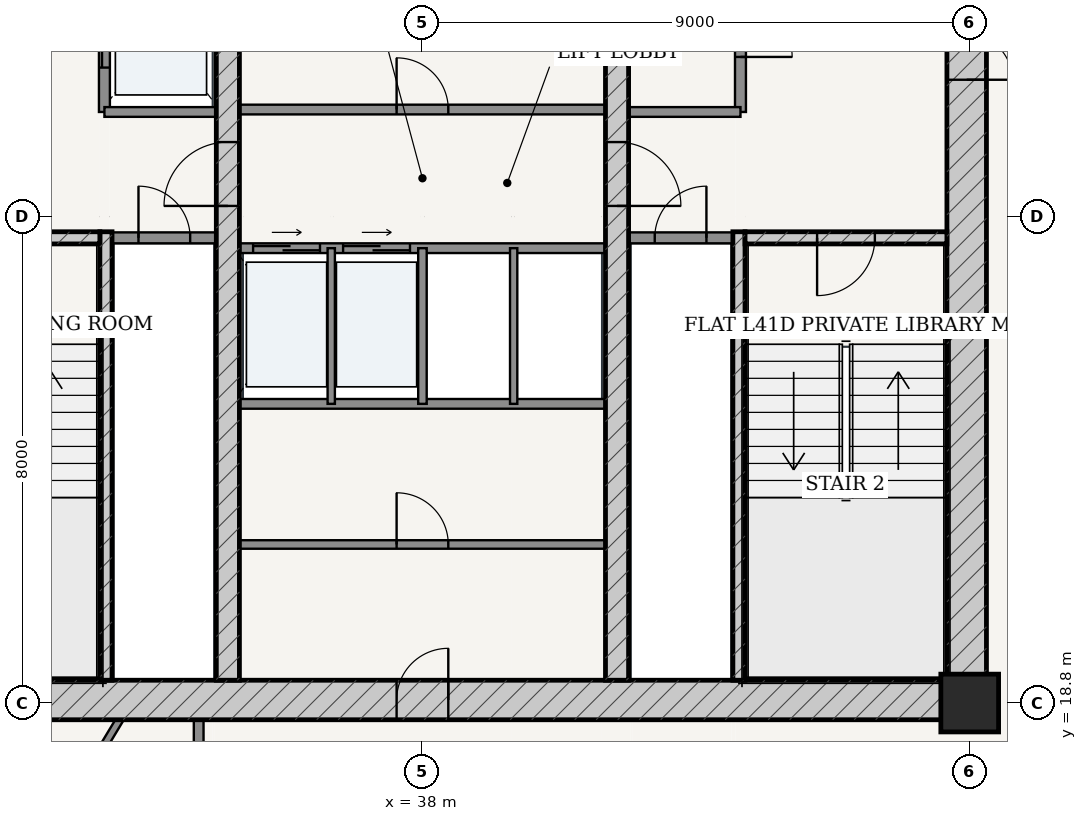
"""IFC4 building model, lengths in metres.
Left out: names, types, materials, properties, quantities, classifications, styles, units other than length and angle.
Written with IfcOpenShell. Run it as: python <this file> out.ifc"""

import sys

from ifc_helpers import new_model, si_unit, direction, frame, frame_2d, origin, origin_2d, place, context, subcontext, project, spatial, rectangle, extrude, source, transform, mapped, element, fill, save


model = new_model("IFC4")
c1 = context("Model", 3, precision=1e-05, world=origin(), true_north=direction((-0.2419218956, 0.970295726276)))
c2 = subcontext(c1, "Body", "Model", "MODEL_VIEW")
j1 = project(units=[si_unit("LENGTHUNIT", "METRE"), si_unit("PLANEANGLEUNIT", "RADIAN")], contexts=[c1])
p1 = place(None, origin())
s1 = spatial("IfcSite", under=j1, at=p1, CompositionType="ELEMENT")
p2 = place(p1, origin())
s2 = spatial("IfcBuilding", under=s1, at=p2, CompositionType="ELEMENT")
p3 = place(p2, frame((0.0, 0.0, 157.0)))
s3 = spatial("IfcBuildingStorey", under=s2, at=p3, CompositionType="ELEMENT", Elevation=157.0)
p4 = place(p3, frame((47.0, 18.8, 0.0), z_axis=(0.0, 0.0, 1.0), x_axis=(1.0, 0.0, 0.0)))
e1 = element("IfcColumn", 1, at=p4, inside=s3, PredefinedType="COLUMN", context=c2, shape_type="SweptSolid", body=[
    extrude(rectangle(XDim=0.95, YDim=0.95, at=origin_2d()), origin(), (0.0, 0.0, 1.0), 3.6),
])
p5 = place(p3, frame((28.725, 18.85, 0.0), z_axis=(0.0, 0.0, 1.0), x_axis=(1.0, 0.0, 0.0)))
e2 = element("IfcWall", 2, at=p5, inside=s3, PredefinedType="SHEAR", context=c2, shape_type="SweptSolid", body=[
    extrude(rectangle(XDim=18.55, YDim=0.65, at=frame_2d((9.275, 0.0))), origin(), (0.0, 0.0, 1.0), 3.33),
])
p6 = place(p5, frame((8.85, 0.0, 0.0)))
e3 = element("IfcOpeningElement", 3, at=p6, cuts=e2, PredefinedType="OPENING", context=c2, shape_type="SweptSolid", body=[
    extrude(rectangle(XDim=0.85, YDim=2.1, at=frame_2d((0.425, 1.05))), frame((0.0, 0.335, 0.0), z_axis=(0.0, -1.0, 0.0), x_axis=(1.0, 0.0, 0.0)), (0.0, 0.0, 1.0), 0.67),
])
p7 = place(p3, frame((46.95, 19.175, 0.0), z_axis=(0.0, 0.0, 1.0), x_axis=(0.0, 1.0, 0.0)))
e4 = element("IfcWall", 4, at=p7, inside=s3, PredefinedType="SHEAR", context=c2, shape_type="SweptSolid", body=[
    extrude(rectangle(XDim=15.25, YDim=0.65, at=frame_2d((7.625, 0.0))), origin(), (0.0, 0.0, 1.0), 3.33),
])
p8 = place(p7, frame((9.875, 0.0, 0.0)))
e5 = element("IfcOpeningElement", 5, at=p8, cuts=e4, PredefinedType="OPENING", context=c2, shape_type="SweptSolid", body=[
    extrude(rectangle(XDim=1.5, YDim=2.2, at=frame_2d((0.75, 1.1))), frame((0.0, 0.335, 0.0), z_axis=(0.0, -1.0, 0.0), x_axis=(1.0, 0.0, 0.0)), (0.0, 0.0, 1.0), 0.67),
])
p9 = place(p3, frame((32.795, 19.175, 0.0), z_axis=(0.0, 0.0, 1.0), x_axis=(0.0, 1.0, 0.0)))
e6 = element("IfcWall", 6, at=p9, inside=s3, PredefinedType="SOLIDWALL", context=c2, shape_type="SweptSolid", body=[
    extrude(rectangle(XDim=7.375, YDim=0.2, at=frame_2d((3.688, 0.0))), origin(), (0.0, 0.0, 1.0), 3.33),
])
p10 = place(p3, frame((29.375, 26.45, 0.0), z_axis=(0.0, 0.0, 1.0), x_axis=(1.0, 0.0, 0.0)))
e7 = element("IfcWall", 7, at=p10, inside=s3, PredefinedType="SOLIDWALL", context=c2, shape_type="SweptSolid", body=[
    extrude(rectangle(XDim=3.32, YDim=0.2, at=frame_2d((1.66, 0.0))), origin(), (0.0, 0.0, 1.0), 3.33),
])
p11 = place(p10, frame((1.185, 0.0, 0.0)))
e8 = element("IfcOpeningElement", 8, at=p11, cuts=e7, PredefinedType="OPENING", context=c2, shape_type="SweptSolid", body=[
    extrude(rectangle(XDim=0.95, YDim=2.15, at=frame_2d((0.475, 1.075))), frame((0.0, 0.11, 0.0), z_axis=(0.0, -1.0, 0.0), x_axis=(1.0, 0.0, 0.0)), (0.0, 0.0, 1.0), 0.22),
])
p12 = place(p3, frame((43.205, 19.175, 0.0), z_axis=(0.0, 0.0, 1.0), x_axis=(0.0, 1.0, 0.0)))
e9 = element("IfcWall", 9, at=p12, inside=s3, PredefinedType="SOLIDWALL", context=c2, shape_type="SweptSolid", body=[
    extrude(rectangle(XDim=7.375, YDim=0.2, at=frame_2d((3.688, 0.0))), origin(), (0.0, 0.0, 1.0), 3.33),
])
p13 = place(p3, frame((43.305, 26.45, 0.0), z_axis=(0.0, 0.0, 1.0), x_axis=(1.0, 0.0, 0.0)))
e10 = element("IfcWall", 10, at=p13, inside=s3, PredefinedType="SOLIDWALL", context=c2, shape_type="SweptSolid", body=[
    extrude(rectangle(XDim=3.32, YDim=0.2, at=frame_2d((1.66, 0.0))), origin(), (0.0, 0.0, 1.0), 3.33),
])
p14 = place(p13, frame((1.185, 0.0, 0.0)))
e11 = element("IfcOpeningElement", 11, at=p14, cuts=e10, PredefinedType="OPENING", context=c2, shape_type="SweptSolid", body=[
    extrude(rectangle(XDim=0.95, YDim=2.15, at=frame_2d((0.475, 1.075))), frame((0.0, 0.11, 0.0), z_axis=(0.0, -1.0, 0.0), x_axis=(1.0, 0.0, 0.0)), (0.0, 0.0, 1.0), 0.22),
])
p15 = place(p3, frame((34.8, 19.175, 0.0), z_axis=(0.0, 0.0, 1.0), x_axis=(0.0, 1.0, 0.0)))
e12 = element("IfcWall", 12, at=p15, inside=s3, PredefinedType="SHEAR", context=c2, shape_type="SweptSolid", body=[
    extrude(rectangle(XDim=15.25, YDim=0.38, at=frame_2d((7.625, 0.0))), origin(), (0.0, 0.0, 1.0), 3.33),
])
p16 = place(p15, frame((7.8, 0.0, 0.0)))
e13 = element("IfcOpeningElement", 13, at=p16, cuts=e12, PredefinedType="OPENING", context=c2, shape_type="SweptSolid", body=[
    extrude(rectangle(XDim=1.05, YDim=2.15, at=frame_2d((0.525, 1.075))), frame((0.0, 0.2, 0.0), z_axis=(0.0, -1.0, 0.0), x_axis=(1.0, 0.0, 0.0)), (0.0, 0.0, 1.0), 0.4),
])
p17 = place(p3, frame((41.2, 19.175, 0.0), z_axis=(0.0, 0.0, 1.0), x_axis=(0.0, 1.0, 0.0)))
e14 = element("IfcWall", 14, at=p17, inside=s3, PredefinedType="SHEAR", context=c2, shape_type="SweptSolid", body=[
    extrude(rectangle(XDim=15.25, YDim=0.38, at=frame_2d((7.625, 0.0))), origin(), (0.0, 0.0, 1.0), 3.33),
])
p18 = place(p17, frame((7.8, 0.0, 0.0)))
e15 = element("IfcOpeningElement", 15, at=p18, cuts=e14, PredefinedType="OPENING", context=c2, shape_type="SweptSolid", body=[
    extrude(rectangle(XDim=1.05, YDim=2.15, at=frame_2d((0.525, 1.075))), frame((0.0, 0.2, 0.0), z_axis=(0.0, -1.0, 0.0), x_axis=(1.0, 0.0, 0.0)), (0.0, 0.0, 1.0), 0.4),
])
p19 = place(p3, frame((32.9, 26.45, 0.0), z_axis=(0.0, 0.0, 1.0), x_axis=(1.0, 0.0, 0.0)))
e16 = element("IfcWall", 16, at=p19, inside=s3, PredefinedType="PARTITIONING", context=c2, shape_type="SweptSolid", body=[
    extrude(rectangle(XDim=1.71, YDim=0.18, at=frame_2d((0.855, 0.0))), origin(), (0.0, 0.0, 1.0), 3.33),
])
p20 = place(p19, frame((0.43, 0.0, 0.0)))
e17 = element("IfcOpeningElement", 17, at=p20, cuts=e16, PredefinedType="OPENING", context=c2, shape_type="SweptSolid", body=[
    extrude(rectangle(XDim=0.85, YDim=2.1, at=frame_2d((0.425, 1.05))), frame((0.0, 0.1, 0.0), z_axis=(0.0, -1.0, 0.0), x_axis=(1.0, 0.0, 0.0)), (0.0, 0.0, 1.0), 0.2),
])
p21 = place(p3, frame((41.39, 26.45, 0.0), z_axis=(0.0, 0.0, 1.0), x_axis=(1.0, 0.0, 0.0)))
e18 = element("IfcWall", 18, at=p21, inside=s3, PredefinedType="PARTITIONING", context=c2, shape_type="SweptSolid", body=[
    extrude(rectangle(XDim=1.71, YDim=0.18, at=frame_2d((0.855, 0.0))), origin(), (0.0, 0.0, 1.0), 3.33),
])
p22 = place(p21, frame((0.43, 0.0, 0.0)))
e19 = element("IfcOpeningElement", 19, at=p22, cuts=e18, PredefinedType="OPENING", context=c2, shape_type="SweptSolid", body=[
    extrude(rectangle(XDim=0.85, YDim=2.1, at=frame_2d((0.425, 1.05))), frame((0.0, 0.1, 0.0), z_axis=(0.0, -1.0, 0.0), x_axis=(1.0, 0.0, 0.0)), (0.0, 0.0, 1.0), 0.2),
])
p23 = place(p3, frame((32.77, 28.52, 0.0), z_axis=(0.0, 0.0, 1.0), x_axis=(0.0, 1.0, 0.0)))
e20 = element("IfcWall", 20, at=p23, inside=s3, PredefinedType="PARTITIONING", context=c2, shape_type="SweptSolid", body=[
    extrude(rectangle(XDim=5.905, YDim=0.18, at=frame_2d((2.953, 0.0))), origin(), (0.0, 0.0, 1.0), 3.33),
])
p24 = place(p23, frame((3.655, 0.0, 0.0)))
e21 = element("IfcOpeningElement", 21, at=p24, cuts=e20, PredefinedType="OPENING", context=c2, shape_type="SweptSolid", body=[
    extrude(rectangle(XDim=1.15, YDim=2.2, at=frame_2d((0.575, 1.1))), frame((0.0, 0.1, 0.0), z_axis=(0.0, -1.0, 0.0), x_axis=(1.0, 0.0, 0.0)), (0.0, 0.0, 1.0), 0.2),
])
p25 = place(p23, frame((0.73, 0.0, 0.0)))
e22 = element("IfcOpeningElement", 22, at=p25, cuts=e20, PredefinedType="OPENING", context=c2, shape_type="SweptSolid", body=[
    extrude(rectangle(XDim=1.2, YDim=2.25, at=frame_2d((0.6, 1.125))), frame((0.0, 0.1, 0.0), z_axis=(0.0, -1.0, 0.0), x_axis=(1.0, 0.0, 0.0)), (0.0, 0.0, 1.0), 0.2),
])
p26 = place(p3, frame((32.77, 28.52, 0.0), z_axis=(0.0, 0.0, 1.0), x_axis=(1.0, 0.0, 0.0)))
e23 = element("IfcWall", 23, at=p26, inside=s3, PredefinedType="PARTITIONING", context=c2, shape_type="SweptSolid", body=[
    extrude(rectangle(XDim=1.84, YDim=0.16, at=frame_2d((0.92, 0.0))), origin(), (0.0, 0.0, 1.0), 3.33),
])
p27 = place(p3, frame((43.23, 28.52, 0.0), z_axis=(0.0, 0.0, 1.0), x_axis=(0.0, 1.0, 0.0)))
e24 = element("IfcWall", 24, at=p27, inside=s3, PredefinedType="PARTITIONING", context=c2, shape_type="SweptSolid", body=[
    extrude(rectangle(XDim=5.905, YDim=0.18, at=frame_2d((2.953, 0.0))), origin(), (0.0, 0.0, 1.0), 3.33),
])
p28 = place(p27, frame((0.905, 0.0, 0.0)))
e25 = element("IfcOpeningElement", 25, at=p28, cuts=e24, PredefinedType="OPENING", context=c2, shape_type="SweptSolid", body=[
    extrude(rectangle(XDim=0.85, YDim=2.1, at=frame_2d((0.425, 1.05))), frame((0.0, 0.1, 0.0), z_axis=(0.0, -1.0, 0.0), x_axis=(1.0, 0.0, 0.0)), (0.0, 0.0, 1.0), 0.2),
])
p29 = place(p27, frame((3.655, 0.0, 0.0)))
e26 = element("IfcOpeningElement", 26, at=p29, cuts=e24, PredefinedType="OPENING", context=c2, shape_type="SweptSolid", body=[
    extrude(rectangle(XDim=1.15, YDim=2.2, at=frame_2d((0.575, 1.1))), frame((0.0, 0.1, 0.0), z_axis=(0.0, -1.0, 0.0), x_axis=(1.0, 0.0, 0.0)), (0.0, 0.0, 1.0), 0.2),
])
p30 = place(p3, frame((41.39, 28.52, 0.0), z_axis=(0.0, 0.0, 1.0), x_axis=(1.0, 0.0, 0.0)))
e27 = element("IfcWall", 27, at=p30, inside=s3, PredefinedType="PARTITIONING", context=c2, shape_type="SweptSolid", body=[
    extrude(rectangle(XDim=1.84, YDim=0.16, at=frame_2d((0.92, 0.0))), origin(), (0.0, 0.0, 1.0), 3.33),
])
p31 = place(p3, frame((34.99, 28.56, 0.0), z_axis=(0.0, 0.0, 1.0), x_axis=(1.0, 0.0, 0.0)))
e28 = element("IfcWall", 28, at=p31, inside=s3, PredefinedType="PARTITIONING", context=c2, shape_type="SweptSolid", body=[
    extrude(rectangle(XDim=6.02, YDim=0.16, at=frame_2d((3.01, 0.0))), origin(), (0.0, 0.0, 1.0), 3.33),
])
p32 = place(p31, frame((2.585, 0.0, 0.0)))
e29 = element("IfcOpeningElement", 29, at=p32, cuts=e28, PredefinedType="OPENING", context=c2, shape_type="SweptSolid", body=[
    extrude(rectangle(XDim=0.85, YDim=2.1, at=frame_2d((0.425, 1.05))), frame((0.0, 0.09, 0.0), z_axis=(0.0, -1.0, 0.0), x_axis=(1.0, 0.0, 0.0)), (0.0, 0.0, 1.0), 0.18),
])
p33 = place(p3, frame((34.99, 26.28, 0.0), z_axis=(0.0, 0.0, 1.0), x_axis=(1.0, 0.0, 0.0)))
e30 = element("IfcWall", 30, at=p33, inside=s3, PredefinedType="PARTITIONING", context=c2, shape_type="SweptSolid", body=[
    extrude(rectangle(XDim=6.02, YDim=0.16, at=frame_2d((3.01, 0.0))), origin(), (0.0, 0.0, 1.0), 3.33),
])
p34 = place(p33, frame((0.225, 0.0, 0.0)))
e31 = element("IfcOpeningElement", 31, at=p34, cuts=e30, PredefinedType="OPENING", context=c2, shape_type="SweptSolid", body=[
    extrude(rectangle(XDim=1.1, YDim=2.2, at=frame_2d((0.55, 1.1))), frame((0.0, 0.09, 0.0), z_axis=(0.0, -1.0, 0.0), x_axis=(1.0, 0.0, 0.0)), (0.0, 0.0, 1.0), 0.18),
])
p35 = place(p33, frame((1.705, 0.0, 0.0)))
e32 = element("IfcOpeningElement", 32, at=p35, cuts=e30, PredefinedType="OPENING", context=c2, shape_type="SweptSolid", body=[
    extrude(rectangle(XDim=1.1, YDim=2.2, at=frame_2d((0.55, 1.1))), frame((0.0, 0.09, 0.0), z_axis=(0.0, -1.0, 0.0), x_axis=(1.0, 0.0, 0.0)), (0.0, 0.0, 1.0), 0.18),
])
p36 = place(p3, frame((34.99, 23.72, 0.0), z_axis=(0.0, 0.0, 1.0), x_axis=(1.0, 0.0, 0.0)))
e33 = element("IfcWall", 33, at=p36, inside=s3, PredefinedType="PARTITIONING", context=c2, shape_type="SweptSolid", body=[
    extrude(rectangle(XDim=6.02, YDim=0.16, at=frame_2d((3.01, 0.0))), origin(), (0.0, 0.0, 1.0), 3.33),
])
p37 = place(p3, frame((36.5, 23.72, 0.0), z_axis=(0.0, 0.0, 1.0), x_axis=(0.0, 1.0, 0.0)))
e34 = element("IfcWall", 34, at=p37, inside=s3, PredefinedType="PARTITIONING", context=c2, shape_type="SweptSolid", body=[
    extrude(rectangle(XDim=2.56, YDim=0.12, at=frame_2d((1.28, 0.0))), origin(), (0.0, 0.0, 1.0), 3.33),
])
p38 = place(p3, frame((38.0, 23.72, 0.0), z_axis=(0.0, 0.0, 1.0), x_axis=(0.0, 1.0, 0.0)))
e35 = element("IfcWall", 35, at=p38, inside=s3, PredefinedType="PARTITIONING", context=c2, shape_type="SweptSolid", body=[
    extrude(rectangle(XDim=2.56, YDim=0.14, at=frame_2d((1.28, 0.0))), origin(), (0.0, 0.0, 1.0), 3.33),
])
p39 = place(p3, frame((39.5, 23.72, 0.0), z_axis=(0.0, 0.0, 1.0), x_axis=(0.0, 1.0, 0.0)))
e36 = element("IfcWall", 36, at=p39, inside=s3, PredefinedType="PARTITIONING", context=c2, shape_type="SweptSolid", body=[
    extrude(rectangle(XDim=2.56, YDim=0.12, at=frame_2d((1.28, 0.0))), origin(), (0.0, 0.0, 1.0), 3.33),
])
p40 = place(p3, frame((34.99, 21.407, 0.0), z_axis=(0.0, 0.0, 1.0), x_axis=(1.0, 0.0, 0.0)))
e37 = element("IfcWall", 37, at=p40, inside=s3, PredefinedType="PARTITIONING", context=c2, shape_type="SweptSolid", body=[
    extrude(rectangle(XDim=6.02, YDim=0.14, at=frame_2d((3.01, 0.0))), origin(), (0.0, 0.0, 1.0), 3.33),
])
p41 = place(p40, frame((2.585, 0.0, 0.0)))
e38 = element("IfcOpeningElement", 38, at=p41, cuts=e37, PredefinedType="OPENING", context=c2, shape_type="SweptSolid", body=[
    extrude(rectangle(XDim=0.85, YDim=2.1, at=frame_2d((0.425, 1.05))), frame((0.0, 0.08, 0.0), z_axis=(0.0, -1.0, 0.0), x_axis=(1.0, 0.0, 0.0)), (0.0, 0.0, 1.0), 0.16),
])
p42 = place(p3, frame((34.32, 16.675, 0.0), z_axis=(0.0, 0.0, 1.0), x_axis=(0.0, 1.0, 0.0)))
e39 = element("IfcWall", 39, at=p42, inside=s3, PredefinedType="PARTITIONING", context=c2, shape_type="SweptSolid", body=[
    extrude(rectangle(XDim=1.85, YDim=0.16, at=frame_2d((0.925, 0.0))), origin(), (0.0, 0.0, 1.0), 3.33),
])
p43 = place(p3, frame((33.02, 18.525, 0.0), z_axis=(0.0, 0.0, 1.0), x_axis=(-0.515677168, -0.856782970421, 0.0)))
e40 = element("IfcWall", 40, at=p43, inside=s3, PredefinedType="PARTITIONING", context=c2, shape_type="SweptSolid", body=[
    extrude(rectangle(XDim=3.159, YDim=0.12, at=frame_2d((1.58, 0.0))), origin(), (0.0, 0.0, 1.0), 3.33),
])
p44 = place(p43, frame((1.15, 0.0, 0.0)))
e41 = element("IfcOpeningElement", 41, at=p44, cuts=e40, PredefinedType="OPENING", context=c2, shape_type="SweptSolid", body=[
    extrude(rectangle(XDim=0.86, YDim=2.15, at=frame_2d((0.43, 1.075))), frame((0.0, 0.07, 0.0), z_axis=(0.0, -1.0, 0.0), x_axis=(1.0, 0.0, 0.0)), (0.0, 0.0, 1.0), 0.14),
])
m1 = source(origin(), c2, "Body", "SweptSolid", [
    extrude(rectangle(XDim=1.5, YDim=2.2, at=frame_2d((0.75, 1.1))), frame((0.0, 0.025, 0.0), z_axis=(0.0, -1.0, 0.0), x_axis=(1.0, 0.0, 0.0)), (0.0, 0.0, 1.0), 0.05),
])
p45 = place(p8, frame((1.5, 0.0, 0.0), z_axis=(0.0, 0.0, 1.0), x_axis=(-1.0, 0.0, 0.0)))
e42 = element("IfcDoor", 42, at=p45, inside=s3, OperationType="DOUBLE_DOOR_SINGLE_SWING", PredefinedType="DOOR", context=c2, shape_type="MappedRepresentation", body=[
    mapped(m1, transform((0.0, 0.0, 0.0), scale=1.0)),
])
fill(e5, e42)
m2 = source(origin(), c2, "Body", "SweptSolid", [
    extrude(rectangle(XDim=1.05, YDim=2.15, at=frame_2d((0.525, 1.075))), frame((0.0, 0.025, 0.0), z_axis=(0.0, -1.0, 0.0), x_axis=(1.0, 0.0, 0.0)), (0.0, 0.0, 1.0), 0.05),
])
p46 = place(p16, origin())
e43 = element("IfcDoor", 43, at=p46, inside=s3, OperationType="SINGLE_SWING_LEFT", PredefinedType="DOOR", context=c2, shape_type="MappedRepresentation", body=[
    mapped(m2, transform((0.0, 0.0, 0.0), scale=1.0)),
])
fill(e13, e43)
p47 = place(p18, frame((1.05, 0.0, 0.0), z_axis=(0.0, 0.0, 1.0), x_axis=(-1.0, 0.0, 0.0)))
e44 = element("IfcDoor", 44, at=p47, inside=s3, OperationType="SINGLE_SWING_RIGHT", PredefinedType="DOOR", context=c2, shape_type="MappedRepresentation", body=[
    mapped(m2, transform((0.0, 0.0, 0.0), scale=1.0)),
])
fill(e15, e44)
m3 = source(origin(), c2, "Body", "SweptSolid", [
    extrude(rectangle(XDim=0.95, YDim=2.15, at=frame_2d((0.475, 1.075))), frame((0.0, 0.025, 0.0), z_axis=(0.0, -1.0, 0.0), x_axis=(1.0, 0.0, 0.0)), (0.0, 0.0, 1.0), 0.05),
])
p48 = place(p14, frame((0.95, 0.0, 0.0), z_axis=(0.0, 0.0, 1.0), x_axis=(-1.0, 0.0, 0.0)))
e45 = element("IfcDoor", 45, at=p48, inside=s3, OperationType="SINGLE_SWING_RIGHT", PredefinedType="DOOR", context=c2, shape_type="MappedRepresentation", body=[
    mapped(m3, transform((0.0, 0.0, 0.0), scale=1.0)),
])
fill(e11, e45)
m4 = source(origin(), c2, "Body", "SweptSolid", [
    extrude(rectangle(XDim=0.85, YDim=2.1, at=frame_2d((0.425, 1.05))), frame((0.0, 0.025, 0.0), z_axis=(0.0, -1.0, 0.0), x_axis=(1.0, 0.0, 0.0)), (0.0, 0.0, 1.0), 0.05),
])
p49 = place(p20, origin())
e46 = element("IfcDoor", 46, at=p49, inside=s3, OperationType="SINGLE_SWING_LEFT", PredefinedType="DOOR", context=c2, shape_type="MappedRepresentation", body=[
    mapped(m4, transform((0.0, 0.0, 0.0), scale=1.0)),
])
fill(e17, e46)
p50 = place(p22, origin())
e47 = element("IfcDoor", 47, at=p50, inside=s3, OperationType="SINGLE_SWING_RIGHT", PredefinedType="DOOR", context=c2, shape_type="MappedRepresentation", body=[
    mapped(m4, transform((0.0, 0.0, 0.0), scale=1.0)),
])
fill(e19, e47)
p51 = place(p28, frame((0.85, 0.0, 0.0), z_axis=(0.0, 0.0, 1.0), x_axis=(-1.0, 0.0, 0.0)))
e48 = element("IfcDoor", 48, at=p51, inside=s3, OperationType="SINGLE_SWING_RIGHT", PredefinedType="DOOR", context=c2, shape_type="MappedRepresentation", body=[
    mapped(m4, transform((0.0, 0.0, 0.0), scale=1.0)),
])
fill(e25, e48)
p52 = place(p32, origin())
e49 = element("IfcDoor", 49, at=p52, inside=s3, OperationType="SINGLE_SWING_LEFT", PredefinedType="DOOR", context=c2, shape_type="MappedRepresentation", body=[
    mapped(m4, transform((0.0, 0.0, 0.0), scale=1.0)),
])
fill(e29, e49)
p53 = place(p6, origin())
e50 = element("IfcDoor", 50, at=p53, inside=s3, OperationType="SINGLE_SWING_RIGHT", PredefinedType="DOOR", context=c2, shape_type="MappedRepresentation", body=[
    mapped(m4, transform((0.0, 0.0, 0.0), scale=1.0)),
])
fill(e3, e50)
p54 = place(p41, origin())
e51 = element("IfcDoor", 51, at=p54, inside=s3, OperationType="SINGLE_SWING_LEFT", PredefinedType="DOOR", context=c2, shape_type="MappedRepresentation", body=[
    mapped(m4, transform((0.0, 0.0, 0.0), scale=1.0)),
])
fill(e38, e51)
m5 = source(origin(), c2, "Body", "SweptSolid", [
    extrude(rectangle(XDim=1.2, YDim=2.25, at=frame_2d((0.6, 1.125))), frame((0.0, 0.025, 0.0), z_axis=(0.0, -1.0, 0.0), x_axis=(1.0, 0.0, 0.0)), (0.0, 0.0, 1.0), 0.05),
])
p55 = place(p25, origin())
e52 = element("IfcDoor", 52, at=p55, inside=s3, OperationType="DOUBLE_DOOR_SLIDING", PredefinedType="DOOR", context=c2, shape_type="MappedRepresentation", body=[
    mapped(m5, transform((0.0, 0.0, 0.0), scale=1.0)),
])
fill(e22, e52)
m6 = source(origin(), c2, "Body", "SweptSolid", [
    extrude(rectangle(XDim=1.1, YDim=2.2, at=frame_2d((0.55, 1.1))), frame((0.0, 0.025, 0.0), z_axis=(0.0, -1.0, 0.0), x_axis=(1.0, 0.0, 0.0)), (0.0, 0.0, 1.0), 0.05),
])
p56 = place(p34, origin())
e53 = element("IfcDoor", 53, at=p56, inside=s3, OperationType="DOUBLE_DOOR_SLIDING", PredefinedType="DOOR", context=c2, shape_type="MappedRepresentation", body=[
    mapped(m6, transform((0.0, 0.0, 0.0), scale=1.0)),
])
fill(e31, e53)
p57 = place(p35, origin())
e54 = element("IfcDoor", 54, at=p57, inside=s3, OperationType="DOUBLE_DOOR_SLIDING", PredefinedType="DOOR", context=c2, shape_type="MappedRepresentation", body=[
    mapped(m6, transform((0.0, 0.0, 0.0), scale=1.0)),
])
fill(e32, e54)
save(model, sys.argv[1])
